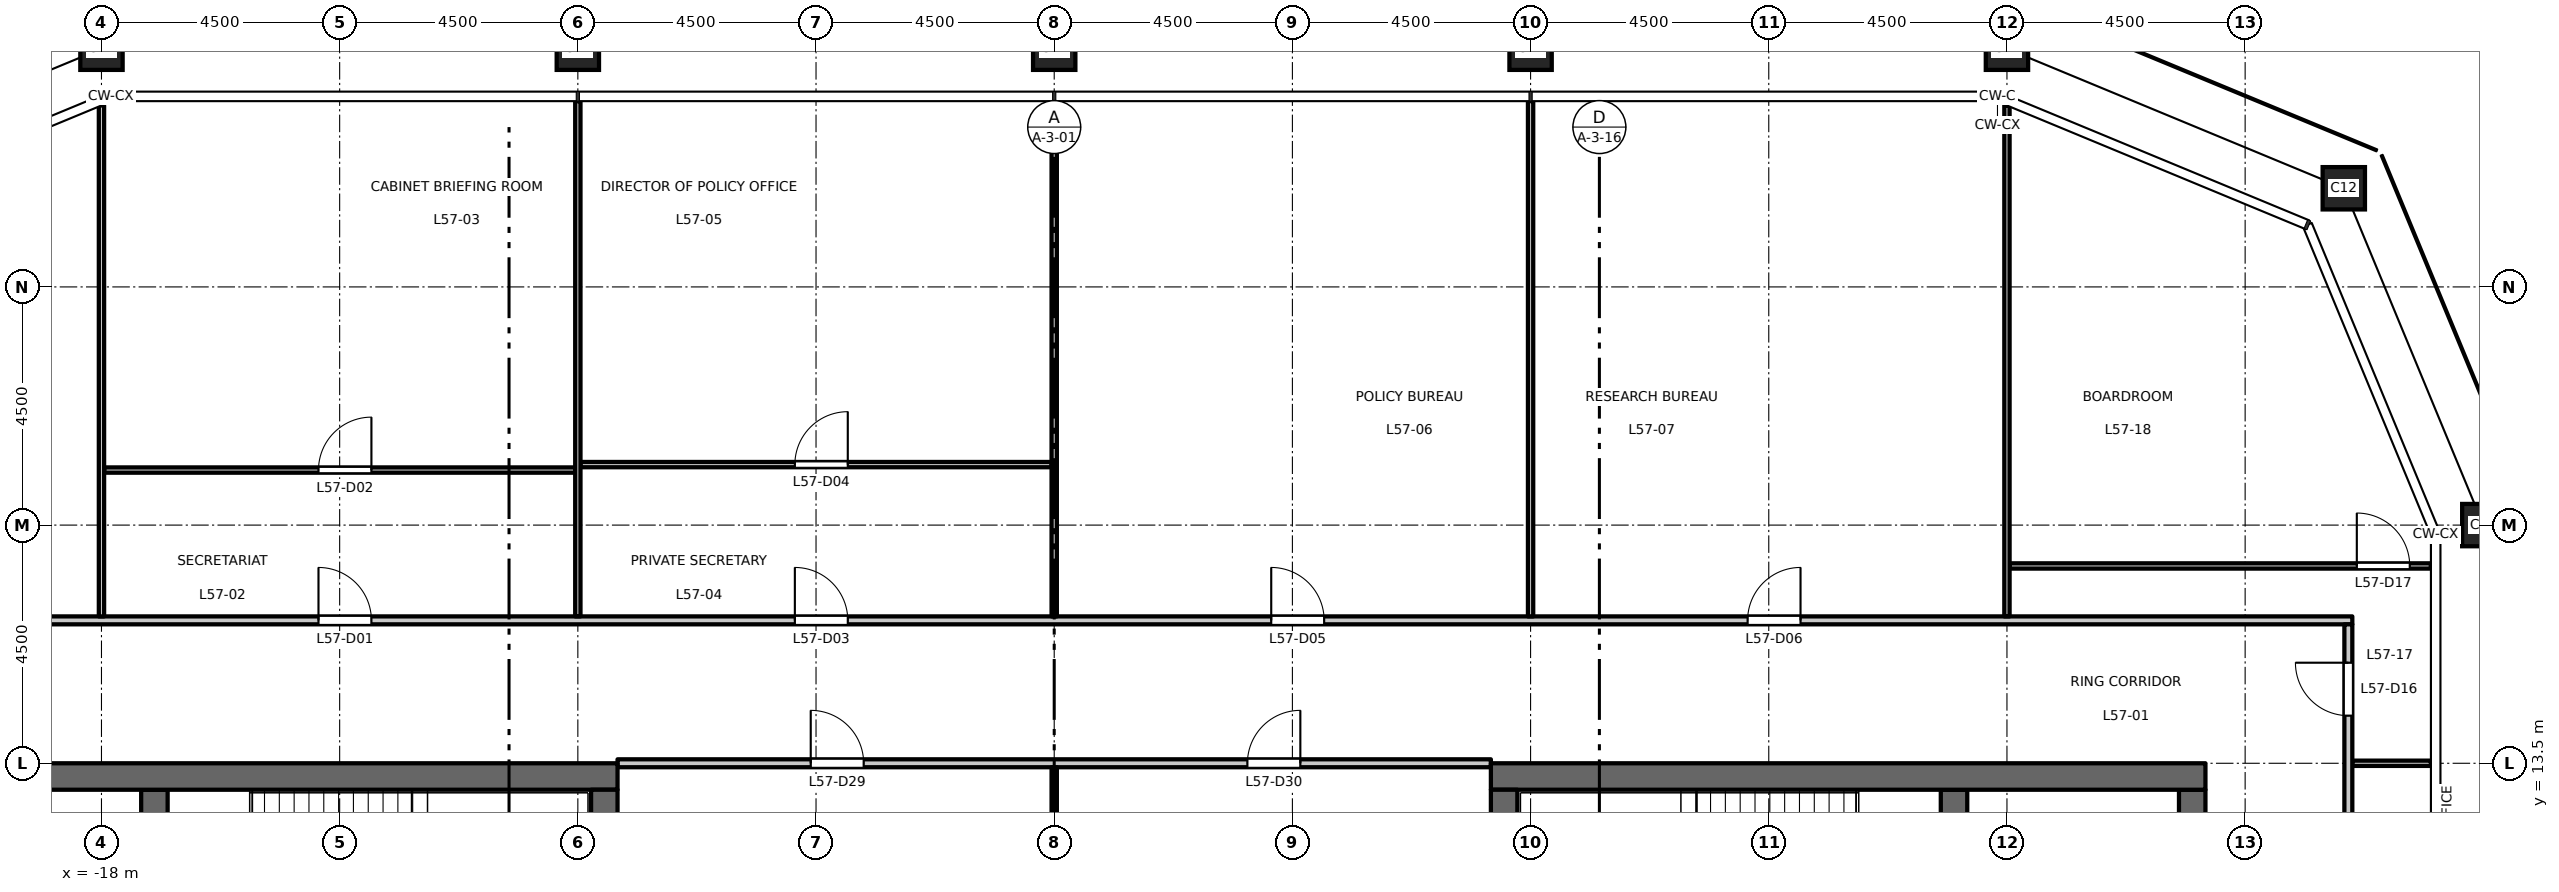
"""IFC4 building model, lengths in metres.
Left out: names, types, materials, properties, quantities, classifications, styles, units other than length and angle.
Written with IfcOpenShell. Run it as: python <this file> out.ifc"""

import sys

from ifc_helpers import new_model, si_unit, direction, frame, frame_2d, origin, origin_2d, place, context, subcontext, project, spatial, rectangle, hollow_rectangle, extrude, element, fill, save


model = new_model("IFC4")
c1 = context("Model", 3, precision=1e-05, world=origin(), true_north=direction((0.0, 1.0)))
c2 = subcontext(c1, "Body", "Model", "MODEL_VIEW")
j1 = project(units=[si_unit("LENGTHUNIT", "METRE"), si_unit("PLANEANGLEUNIT", "RADIAN")], contexts=[c1])
p1 = place(None, origin())
s1 = spatial("IfcSite", under=j1, at=p1, CompositionType="ELEMENT")
p2 = place(p1, origin())
s2 = spatial("IfcBuilding", under=s1, at=p2, CompositionType="ELEMENT")
p3 = place(p2, frame((0.0, 0.0, 264.7)))
s3 = spatial("IfcBuildingStorey", under=s2, at=p3, CompositionType="ELEMENT", Elevation=264.7)
for number, where, z_axis, x_axis in (
    (1, (27.0, 18.0, 0.0), (0.0, 0.0, 1.0), (1.0, 0.0, 0.0)),
    (2, (24.364, 24.364, 0.0), (0.0, 0.0, 1.0), (1.0, 0.0, 0.0)),
    (3, (18.0, 27.0, 0.0), (0.0, 0.0, 1.0), (1.0, 0.0, 0.0)),
    (4, (9.0, 27.0, 0.0), (0.0, 0.0, 1.0), (1.0, 0.0, 0.0)),
    (5, (0.0, 27.0, 0.0), (0.0, 0.0, 1.0), (1.0, 0.0, 0.0)),
    (6, (-9.0, 27.0, 0.0), (0.0, 0.0, 1.0), (1.0, 0.0, 0.0)),
    (7, (-18.0, 27.0, 0.0), (0.0, 0.0, 1.0), (1.0, 0.0, 0.0)),
):
    element("IfcColumn", number, at=place(p3, frame(where, z_axis=z_axis, x_axis=x_axis)), inside=s3, PredefinedType="COLUMN", context=c2, shape_type="SweptSolid", body=[
        extrude(hollow_rectangle(XDim=0.8, YDim=0.8, WallThickness=0.045, at=origin_2d()), origin(), (0.0, 0.0, 1.0), 4.5),
    ])
p4 = place(p3, frame((-17.0, 6.425, 0.0), z_axis=(0.0, 0.0, 1.0), x_axis=(0.0, 1.0, 0.0)))
e8 = element("IfcWall", 8, at=p4, inside=s3, PredefinedType="SHEAR", context=c2, shape_type="SweptSolid", body=[
    extrude(rectangle(XDim=6.575, YDim=0.5, at=frame_2d((3.288, 0.0))), origin(), (0.0, 0.0, 1.0), 4.35),
])
p5 = place(p3, frame((-8.25, 13.25, 0.0), z_axis=(0.0, 0.0, 1.0), x_axis=(-1.0, 0.0, 0.0)))
e9 = element("IfcWall", 9, at=p5, inside=s3, PredefinedType="SHEAR", context=c2, shape_type="SweptSolid", body=[
    extrude(rectangle(XDim=13.5, YDim=0.5, at=frame_2d((6.75, 0.0))), origin(), (0.0, 0.0, 1.0), 4.35),
])
p6 = place(p3, frame((-8.5, -13.0, 0.0), z_axis=(0.0, 0.0, 1.0), x_axis=(0.0, 1.0, 0.0)))
e10 = element("IfcWall", 10, at=p6, inside=s3, PredefinedType="SHEAR", context=c2, shape_type="SweptSolid", body=[
    extrude(rectangle(XDim=26.0, YDim=0.5, at=frame_2d((13.0, 0.0))), origin(), (0.0, 0.0, 1.0), 4.35),
])
p7 = place(p3, frame((21.5, -13.0, 0.0), z_axis=(0.0, 0.0, 1.0), x_axis=(0.0, 1.0, 0.0)))
e11 = element("IfcWall", 11, at=p7, inside=s3, PredefinedType="SHEAR", context=c2, shape_type="SweptSolid", body=[
    extrude(rectangle(XDim=26.0, YDim=0.5, at=frame_2d((13.0, 0.0))), origin(), (0.0, 0.0, 1.0), 4.35),
])
p8 = place(p7, frame((16.825, 0.0, 0.0)))
e12 = element("IfcOpeningElement", 12, at=p8, cuts=e11, PredefinedType="OPENING", context=c2, shape_type="SweptSolid", body=[
    extrude(rectangle(XDim=1.8, YDim=2.1, at=frame_2d((0.9, 1.05))), frame((0.0, 0.26, 0.0), z_axis=(0.0, -1.0, 0.0), x_axis=(1.0, 0.0, 0.0)), (0.0, 0.0, 1.0), 0.52),
])
p9 = place(p7, frame((7.375, 0.0, 0.0)))
e13 = element("IfcOpeningElement", 13, at=p9, cuts=e11, PredefinedType="OPENING", context=c2, shape_type="SweptSolid", body=[
    extrude(rectangle(XDim=1.8, YDim=2.1, at=frame_2d((0.9, 1.05))), frame((0.0, 0.26, 0.0), z_axis=(0.0, -1.0, 0.0), x_axis=(1.0, 0.0, 0.0)), (0.0, 0.0, 1.0), 0.52),
])
p10 = place(p7, frame((14.125, 0.0, 0.0)))
e14 = element("IfcOpeningElement", 14, at=p10, cuts=e11, PredefinedType="OPENING", context=c2, shape_type="SweptSolid", body=[
    extrude(rectangle(XDim=0.9, YDim=2.1, at=frame_2d((0.45, 1.05))), frame((0.0, 0.26, 0.0), z_axis=(0.0, -1.0, 0.0), x_axis=(1.0, 0.0, 0.0)), (0.0, 0.0, 1.0), 0.52),
])
p11 = place(p3, frame((17.0, 6.425, 0.0), z_axis=(0.0, 0.0, 1.0), x_axis=(0.0, 1.0, 0.0)))
e15 = element("IfcWall", 15, at=p11, inside=s3, PredefinedType="SHEAR", context=c2, shape_type="SweptSolid", body=[
    extrude(rectangle(XDim=6.575, YDim=0.5, at=frame_2d((3.288, 0.0))), origin(), (0.0, 0.0, 1.0), 4.35),
])
p12 = place(p3, frame((8.25, 13.25, 0.0), z_axis=(0.0, 0.0, 1.0), x_axis=(1.0, 0.0, 0.0)))
e16 = element("IfcWall", 16, at=p12, inside=s3, PredefinedType="SHEAR", context=c2, shape_type="SweptSolid", body=[
    extrude(rectangle(XDim=13.5, YDim=0.5, at=frame_2d((6.75, 0.0))), origin(), (0.0, 0.0, 1.0), 4.35),
])
p13 = place(p3, frame((8.5, -13.0, 0.0), z_axis=(0.0, 0.0, 1.0), x_axis=(0.0, 1.0, 0.0)))
e17 = element("IfcWall", 17, at=p13, inside=s3, PredefinedType="SHEAR", context=c2, shape_type="SweptSolid", body=[
    extrude(rectangle(XDim=26.0, YDim=0.5, at=frame_2d((13.0, 0.0))), origin(), (0.0, 0.0, 1.0), 4.35),
])
p14 = place(p3, frame((24.525, 13.5, 0.0), z_axis=(0.0, 0.0, 1.0), x_axis=(1.0, 0.0, 0.0)))
e18 = element("IfcWall", 18, at=p14, inside=s3, PredefinedType="PARTITIONING", context=c2, shape_type="SweptSolid", body=[
    extrude(rectangle(XDim=1.485, YDim=0.1, at=frame_2d((0.743, 0.0))), origin(), (0.0, 0.0, 1.0), 4.35),
])
p15 = place(p3, frame((-8.25, 13.5, 0.0), z_axis=(0.0, 0.0, 1.0), x_axis=(1.0, 0.0, 0.0)))
e19 = element("IfcWall", 19, at=p15, inside=s3, PredefinedType="PARTITIONING", context=c2, shape_type="SweptSolid", body=[
    extrude(rectangle(XDim=16.5, YDim=0.15, at=frame_2d((8.25, 0.0))), origin(), (0.0, 0.0, 1.0), 4.35),
])
p16 = place(p15, frame((3.65, 0.0, 0.0)))
e20 = element("IfcOpeningElement", 20, at=p16, cuts=e19, PredefinedType="OPENING", context=c2, shape_type="SweptSolid", body=[
    extrude(rectangle(XDim=1.0, YDim=2.1, at=frame_2d((0.5, 1.05))), frame((0.0, 0.085, 0.0), z_axis=(0.0, -1.0, 0.0), x_axis=(1.0, 0.0, 0.0)), (0.0, 0.0, 1.0), 0.17),
])
p17 = place(p15, frame((11.9, 0.0, 0.0)))
e21 = element("IfcOpeningElement", 21, at=p17, cuts=e19, PredefinedType="OPENING", context=c2, shape_type="SweptSolid", body=[
    extrude(rectangle(XDim=1.0, YDim=2.1, at=frame_2d((0.5, 1.05))), frame((0.0, 0.085, 0.0), z_axis=(0.0, -1.0, 0.0), x_axis=(1.0, 0.0, 0.0)), (0.0, 0.0, 1.0), 0.17),
])
p18 = place(p3, frame((-24.525, 16.2, 0.0), z_axis=(0.0, 0.0, 1.0), x_axis=(1.0, 0.0, 0.0)))
e22 = element("IfcWall", 22, at=p18, inside=s3, PredefinedType="PARTITIONING", context=c2, shape_type="SweptSolid", body=[
    extrude(rectangle(XDim=49.05, YDim=0.15, at=frame_2d((24.525, 0.0))), origin(), (0.0, 0.0, 1.0), 4.35),
])
p19 = place(p18, frame((10.625, 0.0, 0.0)))
e23 = element("IfcOpeningElement", 23, at=p19, cuts=e22, PredefinedType="OPENING", context=c2, shape_type="SweptSolid", body=[
    extrude(rectangle(XDim=1.0, YDim=2.1, at=frame_2d((0.5, 1.05))), frame((0.0, 0.085, 0.0), z_axis=(0.0, -1.0, 0.0), x_axis=(1.0, 0.0, 0.0)), (0.0, 0.0, 1.0), 0.17),
])
p20 = place(p18, frame((19.625, 0.0, 0.0)))
e24 = element("IfcOpeningElement", 24, at=p20, cuts=e22, PredefinedType="OPENING", context=c2, shape_type="SweptSolid", body=[
    extrude(rectangle(XDim=1.0, YDim=2.1, at=frame_2d((0.5, 1.05))), frame((0.0, 0.085, 0.0), z_axis=(0.0, -1.0, 0.0), x_axis=(1.0, 0.0, 0.0)), (0.0, 0.0, 1.0), 0.17),
])
p21 = place(p18, frame((28.625, 0.0, 0.0)))
e25 = element("IfcOpeningElement", 25, at=p21, cuts=e22, PredefinedType="OPENING", context=c2, shape_type="SweptSolid", body=[
    extrude(rectangle(XDim=1.0, YDim=2.1, at=frame_2d((0.5, 1.05))), frame((0.0, 0.085, 0.0), z_axis=(0.0, -1.0, 0.0), x_axis=(1.0, 0.0, 0.0)), (0.0, 0.0, 1.0), 0.17),
])
p22 = place(p18, frame((37.625, 0.0, 0.0)))
e26 = element("IfcOpeningElement", 26, at=p22, cuts=e22, PredefinedType="OPENING", context=c2, shape_type="SweptSolid", body=[
    extrude(rectangle(XDim=1.0, YDim=2.1, at=frame_2d((0.5, 1.05))), frame((0.0, 0.085, 0.0), z_axis=(0.0, -1.0, 0.0), x_axis=(1.0, 0.0, 0.0)), (0.0, 0.0, 1.0), 0.17),
])
p23 = place(p18, frame((2.875, 0.0, 0.0)))
e27 = element("IfcOpeningElement", 27, at=p23, cuts=e22, PredefinedType="OPENING", context=c2, shape_type="SweptSolid", body=[
    extrude(rectangle(XDim=1.0, YDim=2.1, at=frame_2d((0.5, 1.05))), frame((0.0, 0.085, 0.0), z_axis=(0.0, -1.0, 0.0), x_axis=(1.0, 0.0, 0.0)), (0.0, 0.0, 1.0), 0.17),
])
p24 = place(p3, frame((18.05, 17.228, 0.0), z_axis=(0.0, 0.0, 1.0), x_axis=(1.0, 0.0, 0.0)))
e28 = element("IfcWall", 28, at=p24, inside=s3, PredefinedType="PARTITIONING", context=c2, shape_type="SweptSolid", body=[
    extrude(rectangle(XDim=7.96, YDim=0.1, at=frame_2d((3.98, 0.0))), origin(), (0.0, 0.0, 1.0), 4.35),
])
p25 = place(p24, frame((6.56, 0.0, 0.0)))
e29 = element("IfcOpeningElement", 29, at=p25, cuts=e28, PredefinedType="OPENING", context=c2, shape_type="SweptSolid", body=[
    extrude(rectangle(XDim=1.0, YDim=2.1, at=frame_2d((0.5, 1.05))), frame((0.0, 0.06, 0.0), z_axis=(0.0, -1.0, 0.0), x_axis=(1.0, 0.0, 0.0)), (0.0, 0.0, 1.0), 0.12),
])
p26 = place(p3, frame((-17.95, 19.04, 0.0), z_axis=(0.0, 0.0, 1.0), x_axis=(1.0, 0.0, 0.0)))
e30 = element("IfcWall", 30, at=p26, inside=s3, PredefinedType="PARTITIONING", context=c2, shape_type="SweptSolid", body=[
    extrude(rectangle(XDim=8.9, YDim=0.1, at=frame_2d((4.45, 0.0))), origin(), (0.0, 0.0, 1.0), 4.35),
])
p27 = place(p26, frame((4.05, 0.0, 0.0)))
e31 = element("IfcOpeningElement", 31, at=p27, cuts=e30, PredefinedType="OPENING", context=c2, shape_type="SweptSolid", body=[
    extrude(rectangle(XDim=1.0, YDim=2.1, at=frame_2d((0.5, 1.05))), frame((0.0, 0.06, 0.0), z_axis=(0.0, -1.0, 0.0), x_axis=(1.0, 0.0, 0.0)), (0.0, 0.0, 1.0), 0.12),
])
p28 = place(p3, frame((-8.95, 19.143, 0.0), z_axis=(0.0, 0.0, 1.0), x_axis=(1.0, 0.0, 0.0)))
e32 = element("IfcWall", 32, at=p28, inside=s3, PredefinedType="PARTITIONING", context=c2, shape_type="SweptSolid", body=[
    extrude(rectangle(XDim=8.9, YDim=0.1, at=frame_2d((4.45, 0.0))), origin(), (0.0, 0.0, 1.0), 4.35),
])
p29 = place(p28, frame((4.05, 0.0, 0.0)))
e33 = element("IfcOpeningElement", 33, at=p29, cuts=e32, PredefinedType="OPENING", context=c2, shape_type="SweptSolid", body=[
    extrude(rectangle(XDim=1.0, YDim=2.1, at=frame_2d((0.5, 1.05))), frame((0.0, 0.06, 0.0), z_axis=(0.0, -1.0, 0.0), x_axis=(1.0, 0.0, 0.0)), (0.0, 0.0, 1.0), 0.12),
])
p30 = place(p3, frame((-18.0, 16.275, 0.0), z_axis=(0.0, 0.0, 1.0), x_axis=(0.0, 1.0, 0.0)))
e34 = element("IfcWall", 34, at=p30, inside=s3, PredefinedType="PARTITIONING", context=c2, shape_type="SweptSolid", body=[
    extrude(rectangle(XDim=9.653, YDim=0.1, at=frame_2d((4.827, 0.0))), origin(), (0.0, 0.0, 1.0), 3.65),
])
p31 = place(p3, frame((-9.0, 16.275, 0.0), z_axis=(0.0, 0.0, 1.0), x_axis=(0.0, 1.0, 0.0)))
e35 = element("IfcWall", 35, at=p31, inside=s3, PredefinedType="PARTITIONING", context=c2, shape_type="SweptSolid", body=[
    extrude(rectangle(XDim=9.735, YDim=0.1, at=frame_2d((4.868, 0.0))), origin(), (0.0, 0.0, 1.0), 3.65),
])
p32 = place(p3, frame((0.0, 8.6, 0.0), z_axis=(0.0, 0.0, 1.0), x_axis=(0.0, 1.0, 0.0)))
e36 = element("IfcWall", 36, at=p32, inside=s3, PredefinedType="PARTITIONING", context=c2, shape_type="SweptSolid", body=[
    extrude(rectangle(XDim=4.825, YDim=0.1, at=frame_2d((2.413, 0.0))), origin(), (0.0, 0.0, 1.0), 3.55),
])
p33 = place(p3, frame((0.0, 16.275, 0.0), z_axis=(0.0, 0.0, 1.0), x_axis=(0.0, 1.0, 0.0)))
e37 = element("IfcWall", 37, at=p33, inside=s3, PredefinedType="PARTITIONING", context=c2, shape_type="SweptSolid", body=[
    extrude(rectangle(XDim=9.735, YDim=0.1, at=frame_2d((4.868, 0.0))), origin(), (0.0, 0.0, 1.0), 3.55),
])
p34 = place(p3, frame((9.0, 16.275, 0.0), z_axis=(0.0, 0.0, 1.0), x_axis=(0.0, 1.0, 0.0)))
e38 = element("IfcWall", 38, at=p34, inside=s3, PredefinedType="PARTITIONING", context=c2, shape_type="SweptSolid", body=[
    extrude(rectangle(XDim=9.735, YDim=0.1, at=frame_2d((4.868, 0.0))), origin(), (0.0, 0.0, 1.0), 3.65),
])
p35 = place(p3, frame((18.0, 16.275, 0.0), z_axis=(0.0, 0.0, 1.0), x_axis=(0.0, 1.0, 0.0)))
e39 = element("IfcWall", 39, at=p35, inside=s3, PredefinedType="PARTITIONING", context=c2, shape_type="SweptSolid", body=[
    extrude(rectangle(XDim=9.653, YDim=0.1, at=frame_2d((4.827, 0.0))), origin(), (0.0, 0.0, 1.0), 3.65),
])
p36 = place(p3, frame((24.45, -16.125, 0.0), z_axis=(0.0, 0.0, 1.0), x_axis=(0.0, 1.0, 0.0)))
e40 = element("IfcWall", 40, at=p36, inside=s3, PredefinedType="PARTITIONING", context=c2, shape_type="SweptSolid", body=[
    extrude(rectangle(XDim=32.25, YDim=0.15, at=frame_2d((16.125, 0.0))), origin(), (0.0, 0.0, 1.0), 4.35),
])
p37 = place(p36, frame((30.525, 0.0, 0.0)))
e41 = element("IfcOpeningElement", 41, at=p37, cuts=e40, PredefinedType="OPENING", context=c2, shape_type="SweptSolid", body=[
    extrude(rectangle(XDim=1.0, YDim=2.1, at=frame_2d((0.5, 1.05))), frame((0.0, 0.085, 0.0), z_axis=(0.0, -1.0, 0.0), x_axis=(1.0, 0.0, 0.0)), (0.0, 0.0, 1.0), 0.17),
])
p38 = place(p36, frame((0.825, 0.0, 0.0)))
e42 = element("IfcOpeningElement", 42, at=p38, cuts=e40, PredefinedType="OPENING", context=c2, shape_type="SweptSolid", body=[
    extrude(rectangle(XDim=1.0, YDim=2.1, at=frame_2d((0.5, 1.05))), frame((0.0, 0.085, 0.0), z_axis=(0.0, -1.0, 0.0), x_axis=(1.0, 0.0, 0.0)), (0.0, 0.0, 1.0), 0.17),
])
p39 = place(p36, frame((4.275, 0.0, 0.0)))
e43 = element("IfcOpeningElement", 43, at=p39, cuts=e40, PredefinedType="OPENING", context=c2, shape_type="SweptSolid", body=[
    extrude(rectangle(XDim=1.0, YDim=2.1, at=frame_2d((0.5, 1.05))), frame((0.0, 0.085, 0.0), z_axis=(0.0, -1.0, 0.0), x_axis=(1.0, 0.0, 0.0)), (0.0, 0.0, 1.0), 0.17),
])
p40 = place(p36, frame((11.025, 0.0, 0.0)))
e44 = element("IfcOpeningElement", 44, at=p40, cuts=e40, PredefinedType="OPENING", context=c2, shape_type="SweptSolid", body=[
    extrude(rectangle(XDim=1.0, YDim=2.1, at=frame_2d((0.5, 1.05))), frame((0.0, 0.085, 0.0), z_axis=(0.0, -1.0, 0.0), x_axis=(1.0, 0.0, 0.0)), (0.0, 0.0, 1.0), 0.17),
])
p41 = place(p36, frame((20.025, 0.0, 0.0)))
e45 = element("IfcOpeningElement", 45, at=p41, cuts=e40, PredefinedType="OPENING", context=c2, shape_type="SweptSolid", body=[
    extrude(rectangle(XDim=1.0, YDim=2.1, at=frame_2d((0.5, 1.05))), frame((0.0, 0.085, 0.0), z_axis=(0.0, -1.0, 0.0), x_axis=(1.0, 0.0, 0.0)), (0.0, 0.0, 1.0), 0.17),
])
p42 = place(p36, frame((26.775, 0.0, 0.0)))
e46 = element("IfcOpeningElement", 46, at=p42, cuts=e40, PredefinedType="OPENING", context=c2, shape_type="SweptSolid", body=[
    extrude(rectangle(XDim=1.0, YDim=2.1, at=frame_2d((0.5, 1.05))), frame((0.0, 0.085, 0.0), z_axis=(0.0, -1.0, 0.0), x_axis=(1.0, 0.0, 0.0)), (0.0, 0.0, 1.0), 0.17),
])
p43 = place(p19, origin())
e47 = element("IfcDoor", 47, at=p43, inside=s3, OperationType="SINGLE_SWING_LEFT", PredefinedType="DOOR", context=c2, shape_type="SweptSolid", body=[
    extrude(rectangle(XDim=1.0, YDim=2.1, at=frame_2d((0.5, 1.05))), frame((0.0, 0.025, 0.0), z_axis=(0.0, -1.0, 0.0), x_axis=(1.0, 0.0, 0.0)), (0.0, 0.0, 1.0), 0.05),
])
fill(e23, e47)
p44 = place(p27, origin())
e48 = element("IfcDoor", 48, at=p44, inside=s3, OperationType="SINGLE_SWING_RIGHT", PredefinedType="DOOR", context=c2, shape_type="SweptSolid", body=[
    extrude(rectangle(XDim=1.0, YDim=2.1, at=frame_2d((0.5, 1.05))), frame((0.0, 0.025, 0.0), z_axis=(0.0, -1.0, 0.0), x_axis=(1.0, 0.0, 0.0)), (0.0, 0.0, 1.0), 0.05),
])
fill(e31, e48)
p45 = place(p20, origin())
e49 = element("IfcDoor", 49, at=p45, inside=s3, OperationType="SINGLE_SWING_LEFT", PredefinedType="DOOR", context=c2, shape_type="SweptSolid", body=[
    extrude(rectangle(XDim=1.0, YDim=2.1, at=frame_2d((0.5, 1.05))), frame((0.0, 0.025, 0.0), z_axis=(0.0, -1.0, 0.0), x_axis=(1.0, 0.0, 0.0)), (0.0, 0.0, 1.0), 0.05),
])
fill(e24, e49)
p46 = place(p29, origin())
e50 = element("IfcDoor", 50, at=p46, inside=s3, OperationType="SINGLE_SWING_RIGHT", PredefinedType="DOOR", context=c2, shape_type="SweptSolid", body=[
    extrude(rectangle(XDim=1.0, YDim=2.1, at=frame_2d((0.5, 1.05))), frame((0.0, 0.025, 0.0), z_axis=(0.0, -1.0, 0.0), x_axis=(1.0, 0.0, 0.0)), (0.0, 0.0, 1.0), 0.05),
])
fill(e33, e50)
p47 = place(p21, origin())
e51 = element("IfcDoor", 51, at=p47, inside=s3, OperationType="SINGLE_SWING_LEFT", PredefinedType="DOOR", context=c2, shape_type="SweptSolid", body=[
    extrude(rectangle(XDim=1.0, YDim=2.1, at=frame_2d((0.5, 1.05))), frame((0.0, 0.025, 0.0), z_axis=(0.0, -1.0, 0.0), x_axis=(1.0, 0.0, 0.0)), (0.0, 0.0, 1.0), 0.05),
])
fill(e25, e51)
p48 = place(p22, origin())
e52 = element("IfcDoor", 52, at=p48, inside=s3, OperationType="SINGLE_SWING_RIGHT", PredefinedType="DOOR", context=c2, shape_type="SweptSolid", body=[
    extrude(rectangle(XDim=1.0, YDim=2.1, at=frame_2d((0.5, 1.05))), frame((0.0, 0.025, 0.0), z_axis=(0.0, -1.0, 0.0), x_axis=(1.0, 0.0, 0.0)), (0.0, 0.0, 1.0), 0.05),
])
fill(e26, e52)
p49 = place(p37, origin())
e53 = element("IfcDoor", 53, at=p49, inside=s3, OperationType="SINGLE_SWING_RIGHT", PredefinedType="DOOR", context=c2, shape_type="SweptSolid", body=[
    extrude(rectangle(XDim=1.0, YDim=2.1, at=frame_2d((0.5, 1.05))), frame((0.0, 0.025, 0.0), z_axis=(0.0, -1.0, 0.0), x_axis=(1.0, 0.0, 0.0)), (0.0, 0.0, 1.0), 0.05),
])
fill(e41, e53)
p50 = place(p25, origin())
e54 = element("IfcDoor", 54, at=p50, inside=s3, OperationType="SINGLE_SWING_LEFT", PredefinedType="DOOR", context=c2, shape_type="SweptSolid", body=[
    extrude(rectangle(XDim=1.0, YDim=2.1, at=frame_2d((0.5, 1.05))), frame((0.0, 0.025, 0.0), z_axis=(0.0, -1.0, 0.0), x_axis=(1.0, 0.0, 0.0)), (0.0, 0.0, 1.0), 0.05),
])
fill(e29, e54)
p51 = place(p16, origin())
e55 = element("IfcDoor", 55, at=p51, inside=s3, OperationType="SINGLE_SWING_LEFT", PredefinedType="DOOR", context=c2, shape_type="SweptSolid", body=[
    extrude(rectangle(XDim=1.0, YDim=2.1, at=frame_2d((0.5, 1.05))), frame((0.0, 0.025, 0.0), z_axis=(0.0, -1.0, 0.0), x_axis=(1.0, 0.0, 0.0)), (0.0, 0.0, 1.0), 0.05),
])
fill(e20, e55)
p52 = place(p17, origin())
e56 = element("IfcDoor", 56, at=p52, inside=s3, OperationType="SINGLE_SWING_RIGHT", PredefinedType="DOOR", context=c2, shape_type="SweptSolid", body=[
    extrude(rectangle(XDim=1.0, YDim=2.1, at=frame_2d((0.5, 1.05))), frame((0.0, 0.025, 0.0), z_axis=(0.0, -1.0, 0.0), x_axis=(1.0, 0.0, 0.0)), (0.0, 0.0, 1.0), 0.05),
])
fill(e21, e56)
save(model, sys.argv[1])
